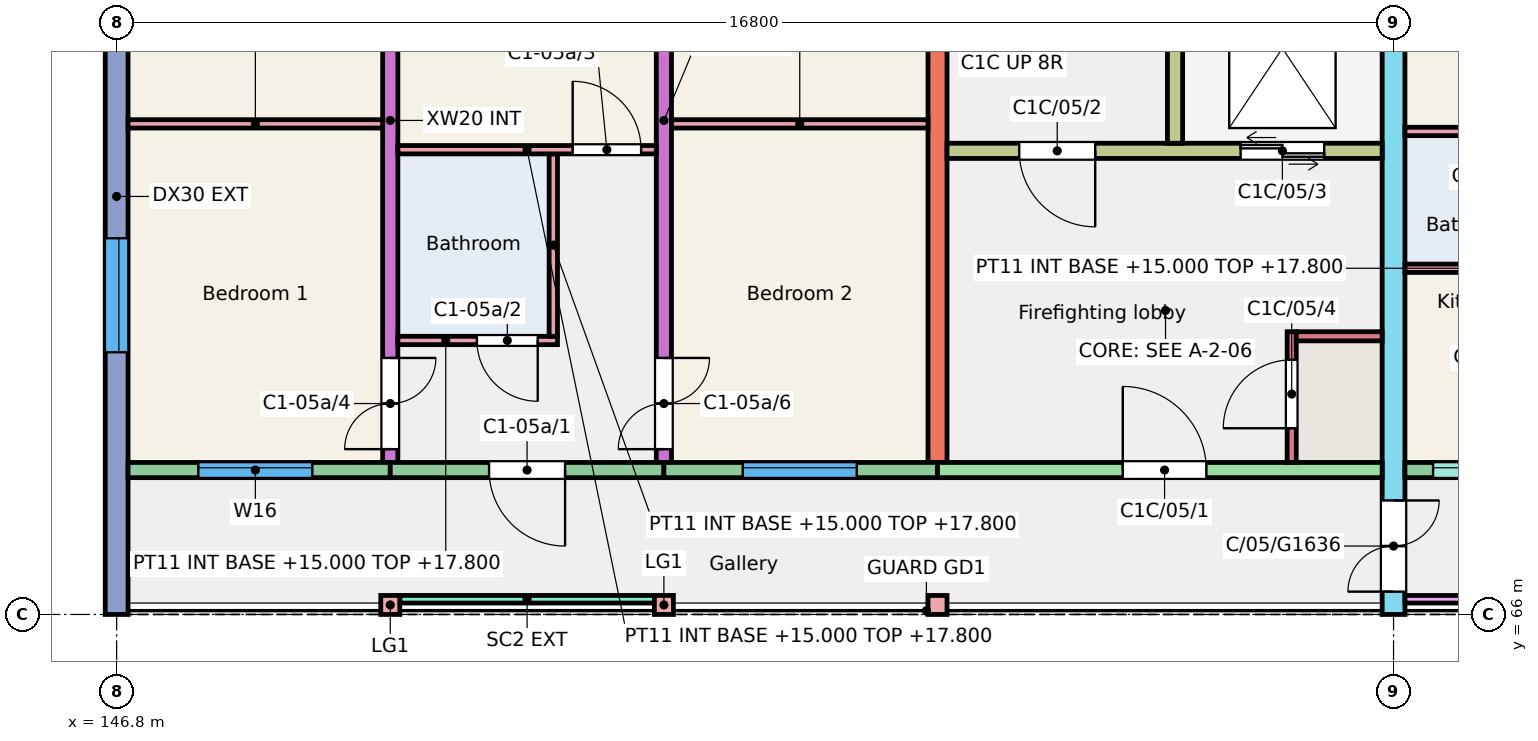
"""IFC4 building model, lengths in metres.
Left out: names, types, materials, properties, quantities, classifications, styles, units other than length and angle.
Written with IfcOpenShell. Run it as: python <this file> out.ifc"""

import sys

from ifc_helpers import new_model, si_unit, direction, frame, frame_2d, origin, origin_2d, place, context, subcontext, project, spatial, rectangle, extrude, element, fill, save


model = new_model("IFC4")
c1 = context("Model", 3, precision=1e-05, world=origin(), true_north=direction((0.0, 1.0)))
c2 = subcontext(c1, "Body", "Model", "MODEL_VIEW")
j1 = project(units=[si_unit("LENGTHUNIT", "METRE"), si_unit("PLANEANGLEUNIT", "RADIAN")], contexts=[c1])
p1 = place(None, origin())
s1 = spatial("IfcSite", under=j1, at=p1, CompositionType="ELEMENT")
p2 = place(p1, origin())
s2 = spatial("IfcBuilding", under=s1, at=p2, CompositionType="ELEMENT")
p3 = place(p2, frame((0.0, 0.0, 15.0)))
s3 = spatial("IfcBuildingStorey", under=s2, at=p3, CompositionType="ELEMENT", Elevation=15.0)
p4 = place(p3, frame((146.8, 66.0, 0.0), z_axis=(0.0, 0.0, 1.0), x_axis=(0.0, 1.0, 0.0)))
e1 = element("IfcWall", 1, at=p4, inside=s3, PredefinedType="SHEAR", context=c2, shape_type="SweptSolid", body=[
    extrude(rectangle(XDim=11.0, YDim=0.3, at=frame_2d((5.5, 0.0))), origin(), (0.0, 0.0, 1.0), 3.0),
])
p5 = place(p4, frame((3.45, 0.0, 0.9)))
e2 = element("IfcOpeningElement", 2, at=p5, cuts=e1, PredefinedType="OPENING", context=c2, shape_type="SweptSolid", body=[
    extrude(rectangle(XDim=1.5, YDim=1.5, at=frame_2d((0.75, 0.75))), frame((0.0, 0.16, 0.0), z_axis=(0.0, -1.0, 0.0), x_axis=(1.0, 0.0, 0.0)), (0.0, 0.0, 1.0), 0.32),
])
p6 = place(p4, frame((8.155, 0.0, 0.9)))
e3 = element("IfcOpeningElement", 3, at=p6, cuts=e1, PredefinedType="OPENING", context=c2, shape_type="SweptSolid", body=[
    extrude(rectangle(XDim=1.2, YDim=1.5, at=frame_2d((0.6, 0.75))), frame((0.0, 0.16, 0.0), z_axis=(0.0, -1.0, 0.0), x_axis=(1.0, 0.0, 0.0)), (0.0, 0.0, 1.0), 0.32),
])
p7 = place(p3, frame((150.4, 68.0, 0.0), z_axis=(0.0, 0.0, 1.0), x_axis=(0.0, 1.0, 0.0)))
e4 = element("IfcWall", 4, at=p7, inside=s3, PredefinedType="SHEAR", context=c2, shape_type="SweptSolid", body=[
    extrude(rectangle(XDim=9.0, YDim=0.2, at=frame_2d((4.5, 0.0))), origin(), (0.0, 0.0, 1.0), 3.0),
])
p8 = place(p7, frame((0.175, 0.0, 0.0)))
e5 = element("IfcOpeningElement", 5, at=p8, cuts=e4, PredefinedType="OPENING", context=c2, shape_type="SweptSolid", body=[
    extrude(rectangle(XDim=1.2, YDim=2.1, at=frame_2d((0.6, 1.05))), frame((0.0, 0.11, 0.0), z_axis=(0.0, -1.0, 0.0), x_axis=(1.0, 0.0, 0.0)), (0.0, 0.0, 1.0), 0.22),
])
p9 = place(p7, frame((6.4, 0.0, 0.0)))
e6 = element("IfcOpeningElement", 6, at=p9, cuts=e4, PredefinedType="OPENING", context=c2, shape_type="SweptSolid", body=[
    extrude(rectangle(XDim=1.2, YDim=2.1, at=frame_2d((0.6, 1.05))), frame((0.0, 0.11, 0.0), z_axis=(0.0, -1.0, 0.0), x_axis=(1.0, 0.0, 0.0)), (0.0, 0.0, 1.0), 0.22),
])
p10 = place(p3, frame((154.0, 68.0, 0.0), z_axis=(0.0, 0.0, 1.0), x_axis=(0.0, 1.0, 0.0)))
e7 = element("IfcWall", 7, at=p10, inside=s3, PredefinedType="SHEAR", context=c2, shape_type="SweptSolid", body=[
    extrude(rectangle(XDim=9.0, YDim=0.2, at=frame_2d((4.5, 0.0))), origin(), (0.0, 0.0, 1.0), 3.0),
])
p11 = place(p10, frame((0.175, 0.0, 0.0)))
e8 = element("IfcOpeningElement", 8, at=p11, cuts=e7, PredefinedType="OPENING", context=c2, shape_type="SweptSolid", body=[
    extrude(rectangle(XDim=1.2, YDim=2.1, at=frame_2d((0.6, 1.05))), frame((0.0, 0.11, 0.0), z_axis=(0.0, -1.0, 0.0), x_axis=(1.0, 0.0, 0.0)), (0.0, 0.0, 1.0), 0.22),
])
p12 = place(p10, frame((6.4, 0.0, 0.0)))
e9 = element("IfcOpeningElement", 9, at=p12, cuts=e7, PredefinedType="OPENING", context=c2, shape_type="SweptSolid", body=[
    extrude(rectangle(XDim=1.2, YDim=2.1, at=frame_2d((0.6, 1.05))), frame((0.0, 0.11, 0.0), z_axis=(0.0, -1.0, 0.0), x_axis=(1.0, 0.0, 0.0)), (0.0, 0.0, 1.0), 0.22),
])
p13 = place(p3, frame((157.6, 68.0, 0.0), z_axis=(0.0, 0.0, 1.0), x_axis=(0.0, 1.0, 0.0)))
e10 = element("IfcWall", 10, at=p13, inside=s3, PredefinedType="SHEAR", context=c2, shape_type="SweptSolid", body=[
    extrude(rectangle(XDim=9.0, YDim=0.25, at=frame_2d((4.5, 0.0))), origin(), (0.0, 0.0, 1.0), 3.0),
])
p14 = place(p3, frame((163.6, 66.0, 0.0), z_axis=(0.0, 0.0, 1.0), x_axis=(0.0, 1.0, 0.0)))
e11 = element("IfcWall", 11, at=p14, inside=s3, PredefinedType="SHEAR", context=c2, shape_type="SweptSolid", body=[
    extrude(rectangle(XDim=11.0, YDim=0.3, at=frame_2d((5.5, 0.0))), origin(), (0.0, 0.0, 1.0), 3.0),
])
p15 = place(p14, frame((0.3, 0.0, 0.0)))
e12 = element("IfcOpeningElement", 12, at=p15, cuts=e11, PredefinedType="OPENING", context=c2, shape_type="SweptSolid", body=[
    extrude(rectangle(XDim=1.2, YDim=2.1, at=frame_2d((0.6, 1.05))), frame((0.0, 0.16, 0.0), z_axis=(0.0, -1.0, 0.0), x_axis=(1.0, 0.0, 0.0)), (0.0, 0.0, 1.0), 0.32),
])
p16 = place(p3, frame((146.95, 67.9, 0.0), z_axis=(0.0, 0.0, 1.0), x_axis=(1.0, 0.0, 0.0)))
e13 = element("IfcWall", 13, at=p16, inside=s3, PredefinedType="SOLIDWALL", context=c2, shape_type="SweptSolid", body=[
    extrude(rectangle(XDim=3.45, YDim=0.2, at=frame_2d((1.725, 0.0))), origin(), (0.0, 0.0, 1.0), 3.0),
])
p17 = place(p16, frame((0.925, 0.0, 0.9)))
e14 = element("IfcOpeningElement", 14, at=p17, cuts=e13, PredefinedType="OPENING", context=c2, shape_type="SweptSolid", body=[
    extrude(rectangle(XDim=1.5, YDim=1.5, at=frame_2d((0.75, 0.75))), frame((0.0, 0.11, 0.0), z_axis=(0.0, -1.0, 0.0), x_axis=(1.0, 0.0, 0.0)), (0.0, 0.0, 1.0), 0.22),
])
p18 = place(p3, frame((150.4, 67.9, 0.0), z_axis=(0.0, 0.0, 1.0), x_axis=(1.0, 0.0, 0.0)))
e15 = element("IfcWall", 15, at=p18, inside=s3, PredefinedType="SOLIDWALL", context=c2, shape_type="SweptSolid", body=[
    extrude(rectangle(XDim=3.6, YDim=0.2, at=frame_2d((1.8, 0.0))), origin(), (0.0, 0.0, 1.0), 3.0),
])
p19 = place(p18, frame((1.3, 0.0, 0.0)))
e16 = element("IfcOpeningElement", 16, at=p19, cuts=e15, PredefinedType="OPENING", context=c2, shape_type="SweptSolid", body=[
    extrude(rectangle(XDim=1.0, YDim=2.1, at=frame_2d((0.5, 1.05))), frame((0.0, 0.11, 0.0), z_axis=(0.0, -1.0, 0.0), x_axis=(1.0, 0.0, 0.0)), (0.0, 0.0, 1.0), 0.22),
])
p20 = place(p3, frame((154.0, 67.9, 0.0), z_axis=(0.0, 0.0, 1.0), x_axis=(1.0, 0.0, 0.0)))
e17 = element("IfcWall", 17, at=p20, inside=s3, PredefinedType="SOLIDWALL", context=c2, shape_type="SweptSolid", body=[
    extrude(rectangle(XDim=3.6, YDim=0.2, at=frame_2d((1.8, 0.0))), origin(), (0.0, 0.0, 1.0), 3.0),
])
p21 = place(p20, frame((1.038, 0.0, 0.9)))
e18 = element("IfcOpeningElement", 18, at=p21, cuts=e17, PredefinedType="OPENING", context=c2, shape_type="SweptSolid", body=[
    extrude(rectangle(XDim=1.5, YDim=1.5, at=frame_2d((0.75, 0.75))), frame((0.0, 0.11, 0.0), z_axis=(0.0, -1.0, 0.0), x_axis=(1.0, 0.0, 0.0)), (0.0, 0.0, 1.0), 0.22),
])
p22 = place(p3, frame((157.6, 67.9, 0.0), z_axis=(0.0, 0.0, 1.0), x_axis=(1.0, 0.0, 0.0)))
e19 = element("IfcWall", 19, at=p22, inside=s3, PredefinedType="SHEAR", context=c2, shape_type="SweptSolid", body=[
    extrude(rectangle(XDim=5.85, YDim=0.2, at=frame_2d((2.925, 0.0))), origin(), (0.0, 0.0, 1.0), 3.0),
])
p23 = place(p22, frame((2.438, 0.0, 0.0)))
e20 = element("IfcOpeningElement", 20, at=p23, cuts=e19, PredefinedType="OPENING", context=c2, shape_type="SweptSolid", body=[
    extrude(rectangle(XDim=1.1, YDim=2.1, at=frame_2d((0.55, 1.05))), frame((0.0, 0.11, 0.0), z_axis=(0.0, -1.0, 0.0), x_axis=(1.0, 0.0, 0.0)), (0.0, 0.0, 1.0), 0.22),
])
p24 = place(p3, frame((157.725, 72.1, 0.0), z_axis=(0.0, 0.0, 1.0), x_axis=(1.0, 0.0, 0.0)))
e21 = element("IfcWall", 21, at=p24, inside=s3, PredefinedType="SHEAR", context=c2, shape_type="SweptSolid", body=[
    extrude(rectangle(XDim=5.725, YDim=0.2, at=frame_2d((2.862, 0.0))), origin(), (0.0, 0.0, 1.0), 3.0),
])
p25 = place(p24, frame((0.95, 0.0, 0.0)))
e22 = element("IfcOpeningElement", 22, at=p25, cuts=e21, PredefinedType="OPENING", context=c2, shape_type="SweptSolid", body=[
    extrude(rectangle(XDim=1.0, YDim=2.1, at=frame_2d((0.5, 1.05))), frame((0.0, 0.11, 0.0), z_axis=(0.0, -1.0, 0.0), x_axis=(1.0, 0.0, 0.0)), (0.0, 0.0, 1.0), 0.22),
])
p26 = place(p24, frame((3.863, 0.0, 0.0)))
e23 = element("IfcOpeningElement", 23, at=p26, cuts=e21, PredefinedType="OPENING", context=c2, shape_type="SweptSolid", body=[
    extrude(rectangle(XDim=1.1, YDim=2.1, at=frame_2d((0.55, 1.05))), frame((0.0, 0.11, 0.0), z_axis=(0.0, -1.0, 0.0), x_axis=(1.0, 0.0, 0.0)), (0.0, 0.0, 1.0), 0.22),
])
p27 = place(p3, frame((160.725, 72.2, 0.0), z_axis=(0.0, 0.0, 1.0), x_axis=(0.0, 1.0, 0.0)))
e24 = element("IfcWall", 24, at=p27, inside=s3, PredefinedType="SHEAR", context=c2, shape_type="SweptSolid", body=[
    extrude(rectangle(XDim=4.8, YDim=0.2, at=frame_2d((2.4, 0.0))), origin(), (0.0, 0.0, 1.0), 3.0),
])
p28 = place(p3, frame((162.26, 68.0, 0.0), z_axis=(0.0, 0.0, 1.0), x_axis=(0.0, 1.0, 0.0)))
e25 = element("IfcWall", 25, at=p28, inside=s3, PredefinedType="SHEAR", context=c2, shape_type="SweptSolid", body=[
    extrude(rectangle(XDim=1.72, YDim=0.12, at=frame_2d((0.86, 0.0))), origin(), (0.0, 0.0, 1.0), 3.0),
])
p29 = place(p28, frame((0.45, 0.0, 0.0)))
e26 = element("IfcOpeningElement", 26, at=p29, cuts=e25, PredefinedType="OPENING", context=c2, shape_type="SweptSolid", body=[
    extrude(rectangle(XDim=0.9, YDim=2.1, at=frame_2d((0.45, 1.05))), frame((0.0, 0.07, 0.0), z_axis=(0.0, -1.0, 0.0), x_axis=(1.0, 0.0, 0.0)), (0.0, 0.0, 1.0), 0.14),
])
p30 = place(p3, frame((162.32, 69.66, 0.0), z_axis=(0.0, 0.0, 1.0), x_axis=(1.0, 0.0, 0.0)))
e27 = element("IfcWall", 27, at=p30, inside=s3, PredefinedType="SHEAR", context=c2, shape_type="SweptSolid", body=[
    extrude(rectangle(XDim=1.13, YDim=0.12, at=frame_2d((0.565, 0.0))), origin(), (0.0, 0.0, 1.0), 3.0),
])
p31 = place(p3, frame((163.75, 67.9, 0.0), z_axis=(0.0, 0.0, 1.0), x_axis=(1.0, 0.0, 0.0)))
e28 = element("IfcWall", 28, at=p31, inside=s3, PredefinedType="SOLIDWALL", context=c2, shape_type="SweptSolid", body=[
    extrude(rectangle(XDim=3.45, YDim=0.2, at=frame_2d((1.725, 0.0))), origin(), (0.0, 0.0, 1.0), 3.0),
])
p32 = place(p31, frame((0.37, 0.0, 1.1)))
e29 = element("IfcOpeningElement", 29, at=p32, cuts=e28, PredefinedType="OPENING", context=c2, shape_type="SweptSolid", body=[
    extrude(rectangle(XDim=1.2, YDim=1.3, at=frame_2d((0.6, 0.65))), frame((0.0, 0.11, 0.0), z_axis=(0.0, -1.0, 0.0), x_axis=(1.0, 0.0, 0.0)), (0.0, 0.0, 1.0), 0.22),
])
p33 = place(p31, frame((2.2, 0.0, 0.0)))
e30 = element("IfcOpeningElement", 30, at=p33, cuts=e28, PredefinedType="OPENING", context=c2, shape_type="SweptSolid", body=[
    extrude(rectangle(XDim=1.0, YDim=2.1, at=frame_2d((0.5, 1.05))), frame((0.0, 0.11, 0.0), z_axis=(0.0, -1.0, 0.0), x_axis=(1.0, 0.0, 0.0)), (0.0, 0.0, 1.0), 0.22),
])
for number, where, z_axis, x_axis in (
    (31, (150.4, 66.125, 0.0), (0.0, 0.0, 1.0), (1.0, 0.0, 0.0)),
    (32, (154.0, 66.125, 0.0), (0.0, 0.0, 1.0), (1.0, 0.0, 0.0)),
    (33, (157.6, 66.125, 0.0), (0.0, 0.0, 1.0), (1.0, 0.0, 0.0)),
):
    element("IfcColumn", number, at=place(p3, frame(where, z_axis=z_axis, x_axis=x_axis)), inside=s3, PredefinedType="COLUMN", context=c2, shape_type="SweptSolid", body=[
        extrude(rectangle(XDim=0.25, YDim=0.25, at=origin_2d()), origin(), (0.0, 0.0, 1.0), 3.0),
    ])
p34 = place(p3, frame((150.525, 66.2, 0.0), z_axis=(0.0, 0.0, 1.0), x_axis=(1.0, 0.0, 0.0)))
e34 = element("IfcWall", 34, at=p34, inside=s3, PredefinedType="SOLIDWALL", context=c2, shape_type="SweptSolid", body=[
    extrude(rectangle(XDim=3.35, YDim=0.1, at=frame_2d((1.675, 0.0))), origin(), (0.0, 0.0, 1.0), 2.45),
])
p35 = place(p3, frame((163.75, 66.2, 0.0), z_axis=(0.0, 0.0, 1.0), x_axis=(1.0, 0.0, 0.0)))
e35 = element("IfcWall", 35, at=p35, inside=s3, PredefinedType="SOLIDWALL", context=c2, shape_type="SweptSolid", body=[
    extrude(rectangle(XDim=3.325, YDim=0.1, at=frame_2d((1.663, 0.0))), origin(), (0.0, 0.0, 1.0), 2.45),
])
p36 = place(p3, frame((150.5, 69.605, 0.0), z_axis=(0.0, 0.0, 1.0), x_axis=(1.0, 0.0, 0.0)))
e36 = element("IfcWall", 36, at=p36, inside=s3, PredefinedType="PARTITIONING", context=c2, shape_type="SweptSolid", body=[
    extrude(rectangle(XDim=2.1, YDim=0.11, at=frame_2d((1.05, 0.0))), origin(), (0.0, 0.0, 1.0), 2.8),
])
p37 = place(p36, frame((1.04, 0.0, 0.0)))
e37 = element("IfcOpeningElement", 37, at=p37, cuts=e36, PredefinedType="OPENING", context=c2, shape_type="SweptSolid", body=[
    extrude(rectangle(XDim=0.8, YDim=2.1, at=frame_2d((0.4, 1.05))), frame((0.0, 0.065, 0.0), z_axis=(0.0, -1.0, 0.0), x_axis=(1.0, 0.0, 0.0)), (0.0, 0.0, 1.0), 0.13),
])
p38 = place(p3, frame((152.545, 69.66, 0.0), z_axis=(0.0, 0.0, 1.0), x_axis=(0.0, 1.0, 0.0)))
e38 = element("IfcWall", 38, at=p38, inside=s3, PredefinedType="PARTITIONING", context=c2, shape_type="SweptSolid", body=[
    extrude(rectangle(XDim=2.4, YDim=0.11, at=frame_2d((1.2, 0.0))), origin(), (0.0, 0.0, 1.0), 2.8),
])
p39 = place(p3, frame((150.5, 72.115, 0.0), z_axis=(0.0, 0.0, 1.0), x_axis=(1.0, 0.0, 0.0)))
e39 = element("IfcWall", 39, at=p39, inside=s3, PredefinedType="PARTITIONING", context=c2, shape_type="SweptSolid", body=[
    extrude(rectangle(XDim=3.4, YDim=0.11, at=frame_2d((1.7, 0.0))), origin(), (0.0, 0.0, 1.0), 2.8),
])
p40 = place(p39, frame((2.3, 0.0, 0.0)))
e40 = element("IfcOpeningElement", 40, at=p40, cuts=e39, PredefinedType="OPENING", context=c2, shape_type="SweptSolid", body=[
    extrude(rectangle(XDim=0.9, YDim=2.1, at=frame_2d((0.45, 1.05))), frame((0.0, 0.065, 0.0), z_axis=(0.0, -1.0, 0.0), x_axis=(1.0, 0.0, 0.0)), (0.0, 0.0, 1.0), 0.13),
])
p41 = place(p3, frame((146.95, 72.455, 0.0), z_axis=(0.0, 0.0, 1.0), x_axis=(1.0, 0.0, 0.0)))
e41 = element("IfcWall", 41, at=p41, inside=s3, PredefinedType="PARTITIONING", context=c2, shape_type="SweptSolid", body=[
    extrude(rectangle(XDim=3.35, YDim=0.11, at=frame_2d((1.675, 0.0))), origin(), (0.0, 0.0, 1.0), 2.8),
])
p42 = place(p3, frame((154.1, 72.455, 0.0), z_axis=(0.0, 0.0, 1.0), x_axis=(1.0, 0.0, 0.0)))
e42 = element("IfcWall", 42, at=p42, inside=s3, PredefinedType="PARTITIONING", context=c2, shape_type="SweptSolid", body=[
    extrude(rectangle(XDim=3.375, YDim=0.11, at=frame_2d((1.688, 0.0))), origin(), (0.0, 0.0, 1.0), 2.8),
])
p43 = place(p3, frame((163.75, 70.555, 0.0), z_axis=(0.0, 0.0, 1.0), x_axis=(1.0, 0.0, 0.0)))
e43 = element("IfcWall", 43, at=p43, inside=s3, PredefinedType="PARTITIONING", context=c2, shape_type="SweptSolid", body=[
    extrude(rectangle(XDim=1.94, YDim=0.11, at=frame_2d((0.97, 0.0))), origin(), (0.0, 0.0, 1.0), 2.8),
])
p44 = place(p3, frame((163.75, 72.355, 0.0), z_axis=(0.0, 0.0, 1.0), x_axis=(1.0, 0.0, 0.0)))
e44 = element("IfcWall", 44, at=p44, inside=s3, PredefinedType="PARTITIONING", context=c2, shape_type="SweptSolid", body=[
    extrude(rectangle(XDim=3.35, YDim=0.11, at=frame_2d((1.675, 0.0))), origin(), (0.0, 0.0, 1.0), 2.8),
])
p45 = place(p44, frame((2.25, 0.0, 0.0)))
e45 = element("IfcOpeningElement", 45, at=p45, cuts=e44, PredefinedType="OPENING", context=c2, shape_type="SweptSolid", body=[
    extrude(rectangle(XDim=0.9, YDim=2.1, at=frame_2d((0.45, 1.05))), frame((0.0, 0.065, 0.0), z_axis=(0.0, -1.0, 0.0), x_axis=(1.0, 0.0, 0.0)), (0.0, 0.0, 1.0), 0.13),
])
p46 = place(p17, origin())
e46 = element("IfcWindow", 46, at=p46, inside=s3, PartitioningType="SINGLE_PANEL", PredefinedType="WINDOW", context=c2, shape_type="SweptSolid", body=[
    extrude(rectangle(XDim=1.5, YDim=1.5, at=frame_2d((0.75, 0.75))), frame((0.0, 0.06, 0.0), z_axis=(0.0, -1.0, 0.0), x_axis=(1.0, 0.0, 0.0)), (0.0, 0.0, 1.0), 0.06),
])
fill(e14, e46)
p47 = place(p21, origin())
e47 = element("IfcWindow", 47, at=p47, inside=s3, PartitioningType="SINGLE_PANEL", PredefinedType="WINDOW", context=c2, shape_type="SweptSolid", body=[
    extrude(rectangle(XDim=1.5, YDim=1.5, at=frame_2d((0.75, 0.75))), frame((0.0, 0.06, 0.0), z_axis=(0.0, -1.0, 0.0), x_axis=(1.0, 0.0, 0.0)), (0.0, 0.0, 1.0), 0.06),
])
fill(e18, e47)
p48 = place(p5, origin())
e48 = element("IfcWindow", 48, at=p48, inside=s3, PartitioningType="SINGLE_PANEL", PredefinedType="WINDOW", context=c2, shape_type="SweptSolid", body=[
    extrude(rectangle(XDim=1.5, YDim=1.5, at=frame_2d((0.75, 0.75))), frame((0.0, 0.0, 0.0), z_axis=(0.0, -1.0, 0.0), x_axis=(1.0, 0.0, 0.0)), (0.0, 0.0, 1.0), 0.06),
])
fill(e2, e48)
p49 = place(p32, origin())
e49 = element("IfcWindow", 49, at=p49, inside=s3, PartitioningType="SINGLE_PANEL", PredefinedType="WINDOW", context=c2, shape_type="SweptSolid", body=[
    extrude(rectangle(XDim=1.2, YDim=1.3, at=frame_2d((0.6, 0.65))), frame((0.0, 0.06, 0.0), z_axis=(0.0, -1.0, 0.0), x_axis=(1.0, 0.0, 0.0)), (0.0, 0.0, 1.0), 0.06),
])
fill(e29, e49)
p50 = place(p19, origin())
e50 = element("IfcDoor", 50, at=p50, inside=s3, OperationType="SINGLE_SWING_RIGHT", PredefinedType="DOOR", context=c2, shape_type="SweptSolid", body=[
    extrude(rectangle(XDim=1.0, YDim=2.1, at=frame_2d((0.5, 1.05))), frame((0.0, 0.025, 0.0), z_axis=(0.0, -1.0, 0.0), x_axis=(1.0, 0.0, 0.0)), (0.0, 0.0, 1.0), 0.05),
])
fill(e16, e50)
p51 = place(p37, origin())
e51 = element("IfcDoor", 51, at=p51, inside=s3, OperationType="SINGLE_SWING_RIGHT", PredefinedType="DOOR", context=c2, shape_type="SweptSolid", body=[
    extrude(rectangle(XDim=0.8, YDim=2.1, at=frame_2d((0.4, 1.05))), frame((0.0, 0.025, 0.0), z_axis=(0.0, -1.0, 0.0), x_axis=(1.0, 0.0, 0.0)), (0.0, 0.0, 1.0), 0.05),
])
fill(e37, e51)
p52 = place(p40, origin())
e52 = element("IfcDoor", 52, at=p52, inside=s3, OperationType="SINGLE_SWING_LEFT", PredefinedType="DOOR", context=c2, shape_type="SweptSolid", body=[
    extrude(rectangle(XDim=0.9, YDim=2.1, at=frame_2d((0.45, 1.05))), frame((0.0, 0.025, 0.0), z_axis=(0.0, -1.0, 0.0), x_axis=(1.0, 0.0, 0.0)), (0.0, 0.0, 1.0), 0.05),
])
fill(e40, e52)
p53 = place(p8, origin())
e53 = element("IfcDoor", 53, at=p53, inside=s3, OperationType="DOUBLE_DOOR_SINGLE_SWING", PredefinedType="DOOR", context=c2, shape_type="SweptSolid", body=[
    extrude(rectangle(XDim=1.2, YDim=2.1, at=frame_2d((0.6, 1.05))), frame((0.0, 0.025, 0.0), z_axis=(0.0, -1.0, 0.0), x_axis=(1.0, 0.0, 0.0)), (0.0, 0.0, 1.0), 0.05),
])
fill(e5, e53)
p54 = place(p11, origin())
e54 = element("IfcDoor", 54, at=p54, inside=s3, OperationType="DOUBLE_DOOR_SINGLE_SWING", PredefinedType="DOOR", context=c2, shape_type="SweptSolid", body=[
    extrude(rectangle(XDim=1.2, YDim=2.1, at=frame_2d((0.6, 1.05))), frame((0.0, 0.025, 0.0), z_axis=(0.0, -1.0, 0.0), x_axis=(1.0, 0.0, 0.0)), (0.0, 0.0, 1.0), 0.05),
])
fill(e8, e54)
p55 = place(p23, origin())
e55 = element("IfcDoor", 55, at=p55, inside=s3, OperationType="SINGLE_SWING_LEFT", PredefinedType="DOOR", context=c2, shape_type="SweptSolid", body=[
    extrude(rectangle(XDim=1.1, YDim=2.1, at=frame_2d((0.55, 1.05))), frame((0.0, 0.025, 0.0), z_axis=(0.0, -1.0, 0.0), x_axis=(1.0, 0.0, 0.0)), (0.0, 0.0, 1.0), 0.05),
])
fill(e20, e55)
p56 = place(p25, origin())
e56 = element("IfcDoor", 56, at=p56, inside=s3, OperationType="SINGLE_SWING_RIGHT", PredefinedType="DOOR", context=c2, shape_type="SweptSolid", body=[
    extrude(rectangle(XDim=1.0, YDim=2.1, at=frame_2d((0.5, 1.05))), frame((0.0, 0.025, 0.0), z_axis=(0.0, -1.0, 0.0), x_axis=(1.0, 0.0, 0.0)), (0.0, 0.0, 1.0), 0.05),
])
fill(e22, e56)
p57 = place(p26, origin())
e57 = element("IfcDoor", 57, at=p57, inside=s3, OperationType="DOUBLE_DOOR_SLIDING", PredefinedType="DOOR", context=c2, shape_type="SweptSolid", body=[
    extrude(rectangle(XDim=1.1, YDim=2.1, at=frame_2d((0.55, 1.05))), frame((0.0, 0.025, 0.0), z_axis=(0.0, -1.0, 0.0), x_axis=(1.0, 0.0, 0.0)), (0.0, 0.0, 1.0), 0.05),
])
fill(e23, e57)
p58 = place(p29, origin())
e58 = element("IfcDoor", 58, at=p58, inside=s3, OperationType="SINGLE_SWING_LEFT", PredefinedType="DOOR", context=c2, shape_type="SweptSolid", body=[
    extrude(rectangle(XDim=0.9, YDim=2.1, at=frame_2d((0.45, 1.05))), frame((0.0, 0.025, 0.0), z_axis=(0.0, -1.0, 0.0), x_axis=(1.0, 0.0, 0.0)), (0.0, 0.0, 1.0), 0.05),
])
fill(e26, e58)
p59 = place(p15, origin())
e59 = element("IfcDoor", 59, at=p59, inside=s3, OperationType="DOUBLE_DOOR_SINGLE_SWING", PredefinedType="DOOR", context=c2, shape_type="SweptSolid", body=[
    extrude(rectangle(XDim=1.2, YDim=2.1, at=frame_2d((0.6, 1.05))), frame((0.0, 0.025, 0.0), z_axis=(0.0, -1.0, 0.0), x_axis=(1.0, 0.0, 0.0)), (0.0, 0.0, 1.0), 0.05),
])
fill(e12, e59)
save(model, sys.argv[1])
